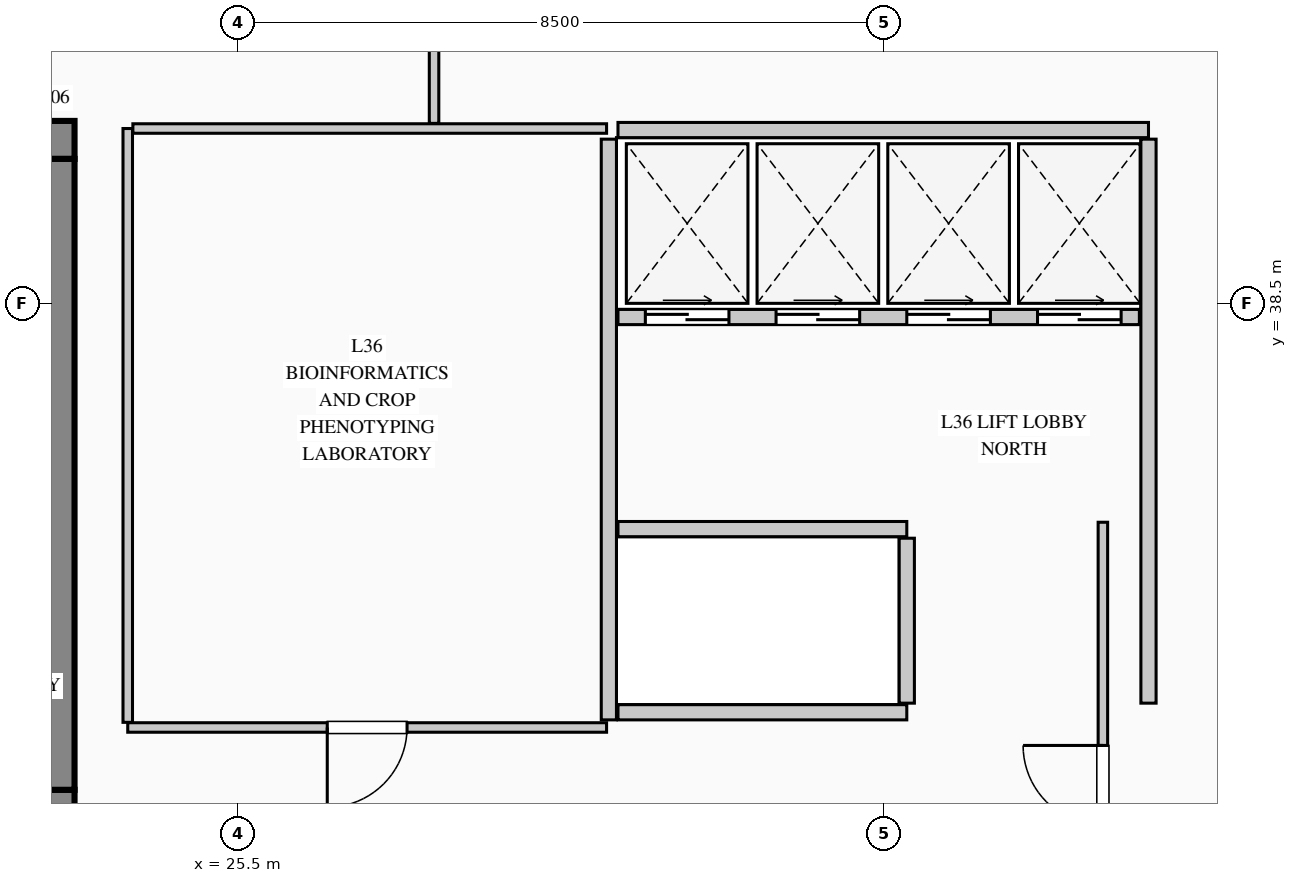
"""IFC4 building model, lengths in metres.
Left out: names, types, materials, properties, quantities, classifications, styles, units other than length and angle.
Written with IfcOpenShell. Run it as: python <this file> out.ifc"""

import sys

from ifc_helpers import new_model, si_unit, direction, frame, frame_2d, origin, place, context, subcontext, project, spatial, rectangle, extrude, element, fill, save


model = new_model("IFC4")
c1 = context("Model", 3, precision=1e-05, world=origin(), true_north=direction((0.0, 1.0)))
c2 = subcontext(c1, "Body", "Model", "MODEL_VIEW")
j1 = project(units=[si_unit("LENGTHUNIT", "METRE"), si_unit("PLANEANGLEUNIT", "RADIAN")], contexts=[c1])
p1 = place(None, origin())
s1 = spatial("IfcSite", under=j1, at=p1, CompositionType="ELEMENT")
p2 = place(p1, origin())
s2 = spatial("IfcBuilding", under=s1, at=p2, CompositionType="ELEMENT")
p3 = place(p2, frame((0.0, 0.0, 154.85)))
s3 = spatial("IfcBuildingStorey", under=s2, at=p3, CompositionType="ELEMENT", Elevation=154.85)
p4 = place(p3, frame((5.5, 40.65, 0.0), z_axis=(0.0, 0.0, 1.0), x_axis=(1.0, 0.0, 0.0)))
e1 = element("IfcWall", 1, at=p4, inside=s3, PredefinedType="SHEAR", context=c2, shape_type="SweptSolid", body=[
    extrude(rectangle(XDim=17.85, YDim=0.5, at=frame_2d((8.925, 0.0))), origin(), (0.0, 0.0, 1.0), 3.95),
])
p5 = place(p4, frame((15.945, 0.0, 0.0)))
e2 = element("IfcOpeningElement", 2, at=p5, cuts=e1, PredefinedType="OPENING", context=c2, shape_type="SweptSolid", body=[
    extrude(rectangle(XDim=1.18, YDim=2.25, at=frame_2d((0.59, 1.125))), frame((0.0, 0.26, 0.0), z_axis=(0.0, -1.0, 0.0), x_axis=(1.0, 0.0, 0.0)), (0.0, 0.0, 1.0), 0.52),
])
p6 = place(p3, frame((5.5, 31.85, 0.0), z_axis=(0.0, 0.0, 1.0), x_axis=(1.0, 0.0, 0.0)))
e3 = element("IfcWall", 3, at=p6, inside=s3, PredefinedType="SHEAR", context=c2, shape_type="SweptSolid", body=[
    extrude(rectangle(XDim=17.85, YDim=0.5, at=frame_2d((8.925, 0.0))), origin(), (0.0, 0.0, 1.0), 3.95),
])
p7 = place(p6, frame((3.15, 0.0, 0.0)))
e4 = element("IfcOpeningElement", 4, at=p7, cuts=e3, PredefinedType="OPENING", context=c2, shape_type="SweptSolid", body=[
    extrude(rectangle(XDim=1.2, YDim=2.2, at=frame_2d((0.6, 1.1))), frame((0.0, 0.26, 0.0), z_axis=(0.0, -1.0, 0.0), x_axis=(1.0, 0.0, 0.0)), (0.0, 0.0, 1.0), 0.52),
])
p8 = place(p6, frame((7.0, 0.0, 0.0)))
e5 = element("IfcOpeningElement", 5, at=p8, cuts=e3, PredefinedType="OPENING", context=c2, shape_type="SweptSolid", body=[
    extrude(rectangle(XDim=1.2, YDim=2.2, at=frame_2d((0.6, 1.1))), frame((0.0, 0.26, 0.0), z_axis=(0.0, -1.0, 0.0), x_axis=(1.0, 0.0, 0.0)), (0.0, 0.0, 1.0), 0.52),
])
p9 = place(p6, frame((8.85, 0.0, 0.0)))
e6 = element("IfcOpeningElement", 6, at=p9, cuts=e3, PredefinedType="OPENING", context=c2, shape_type="SweptSolid", body=[
    extrude(rectangle(XDim=1.15, YDim=2.2, at=frame_2d((0.575, 1.1))), frame((0.0, 0.26, 0.0), z_axis=(0.0, -1.0, 0.0), x_axis=(1.0, 0.0, 0.0)), (0.0, 0.0, 1.0), 0.52),
])
p10 = place(p6, frame((15.95, 0.0, 0.0)))
e7 = element("IfcOpeningElement", 7, at=p10, cuts=e3, PredefinedType="OPENING", context=c2, shape_type="SweptSolid", body=[
    extrude(rectangle(XDim=1.2, YDim=2.2, at=frame_2d((0.6, 1.1))), frame((0.0, 0.26, 0.0), z_axis=(0.0, -1.0, 0.0), x_axis=(1.0, 0.0, 0.0)), (0.0, 0.0, 1.0), 0.52),
])
p11 = place(p3, frame((23.1, 32.1, 0.0), z_axis=(0.0, 0.0, 1.0), x_axis=(0.0, 1.0, 0.0)))
e8 = element("IfcWall", 8, at=p11, inside=s3, PredefinedType="SHEAR", context=c2, shape_type="SweptSolid", body=[
    extrude(rectangle(XDim=8.3, YDim=0.5, at=frame_2d((4.15, 0.0))), origin(), (0.0, 0.0, 1.0), 3.95),
])
p12 = place(p3, frame((30.38, 33.02, 0.0), z_axis=(0.0, 0.0, 1.0), x_axis=(0.0, 1.0, 0.0)))
e9 = element("IfcWall", 9, at=p12, inside=s3, PredefinedType="PARTITIONING", context=c2, shape_type="SweptSolid", body=[
    extrude(rectangle(XDim=7.64, YDim=0.2, at=frame_2d((3.82, 0.0))), origin(), (0.0, 0.0, 1.0), 3.69),
])
p13 = place(p3, frame((30.5, 40.78, 0.0), z_axis=(0.0, 0.0, 1.0), x_axis=(1.0, 0.0, 0.0)))
e10 = element("IfcWall", 10, at=p13, inside=s3, PredefinedType="PARTITIONING", context=c2, shape_type="SweptSolid", body=[
    extrude(rectangle(XDim=6.98, YDim=0.2, at=frame_2d((3.49, 0.0))), origin(), (0.0, 0.0, 1.0), 3.69),
])
p14 = place(p3, frame((37.48, 33.24, 0.0), z_axis=(0.0, 0.0, 1.0), x_axis=(0.0, 1.0, 0.0)))
e11 = element("IfcWall", 11, at=p14, inside=s3, PredefinedType="PARTITIONING", context=c2, shape_type="SweptSolid", body=[
    extrude(rectangle(XDim=7.42, YDim=0.2, at=frame_2d((3.71, 0.0))), origin(), (0.0, 0.0, 1.0), 3.69),
])
p15 = place(p3, frame((30.5, 38.32, 0.0), z_axis=(0.0, 0.0, 1.0), x_axis=(1.0, 0.0, 0.0)))
e12 = element("IfcWall", 12, at=p15, inside=s3, PredefinedType="PARTITIONING", context=c2, shape_type="SweptSolid", body=[
    extrude(rectangle(XDim=6.86, YDim=0.2, at=frame_2d((3.43, 0.0))), origin(), (0.0, 0.0, 1.0), 3.69),
])
p16 = place(p15, frame((0.36, 0.0, 0.0)))
e13 = element("IfcOpeningElement", 13, at=p16, cuts=e12, PredefinedType="OPENING", context=c2, shape_type="SweptSolid", body=[
    extrude(rectangle(XDim=1.1, YDim=2.2, at=frame_2d((0.55, 1.1))), frame((0.0, 0.11, 0.0), z_axis=(0.0, -1.0, 0.0), x_axis=(1.0, 0.0, 0.0)), (0.0, 0.0, 1.0), 0.22),
])
p17 = place(p15, frame((2.08, 0.0, 0.0)))
e14 = element("IfcOpeningElement", 14, at=p17, cuts=e12, PredefinedType="OPENING", context=c2, shape_type="SweptSolid", body=[
    extrude(rectangle(XDim=1.1, YDim=2.2, at=frame_2d((0.55, 1.1))), frame((0.0, 0.11, 0.0), z_axis=(0.0, -1.0, 0.0), x_axis=(1.0, 0.0, 0.0)), (0.0, 0.0, 1.0), 0.22),
])
p18 = place(p15, frame((3.8, 0.0, 0.0)))
e15 = element("IfcOpeningElement", 15, at=p18, cuts=e12, PredefinedType="OPENING", context=c2, shape_type="SweptSolid", body=[
    extrude(rectangle(XDim=1.1, YDim=2.2, at=frame_2d((0.55, 1.1))), frame((0.0, 0.11, 0.0), z_axis=(0.0, -1.0, 0.0), x_axis=(1.0, 0.0, 0.0)), (0.0, 0.0, 1.0), 0.22),
])
p19 = place(p15, frame((5.52, 0.0, 0.0)))
e16 = element("IfcOpeningElement", 16, at=p19, cuts=e12, PredefinedType="OPENING", context=c2, shape_type="SweptSolid", body=[
    extrude(rectangle(XDim=1.1, YDim=2.2, at=frame_2d((0.55, 1.1))), frame((0.0, 0.11, 0.0), z_axis=(0.0, -1.0, 0.0), x_axis=(1.0, 0.0, 0.0)), (0.0, 0.0, 1.0), 0.22),
])
for number, where, z_axis, x_axis in (
    (17, (30.5, 35.53, 0.0), (0.0, 0.0, 1.0), (1.0, 0.0, 0.0)),
    (18, (30.5, 33.12, 0.0), (0.0, 0.0, 1.0), (1.0, 0.0, 0.0)),
):
    element("IfcWall", number, at=place(p3, frame(where, z_axis=z_axis, x_axis=x_axis)), inside=s3, PredefinedType="PARTITIONING", context=c2, shape_type="SweptSolid", body=[
        extrude(rectangle(XDim=3.8, YDim=0.2, at=frame_2d((1.9, 0.0))), origin(), (0.0, 0.0, 1.0), 3.69),
    ])
p20 = place(p3, frame((34.3, 33.24, 0.0), z_axis=(0.0, 0.0, 1.0), x_axis=(0.0, 1.0, 0.0)))
e19 = element("IfcWall", 19, at=p20, inside=s3, PredefinedType="PARTITIONING", context=c2, shape_type="SweptSolid", body=[
    extrude(rectangle(XDim=2.17, YDim=0.2, at=frame_2d((1.085, 0.0))), origin(), (0.0, 0.0, 1.0), 3.69),
])
p21 = place(p3, frame((30.35, 32.92, 0.0), z_axis=(0.0, 0.0, 1.0), x_axis=(-1.0, 0.0, 0.0)))
e20 = element("IfcWall", 20, at=p21, inside=s3, PredefinedType="PARTITIONING", context=c2, shape_type="SweptSolid", body=[
    extrude(rectangle(XDim=6.3, YDim=0.125, at=frame_2d((3.15, 0.0))), origin(), (0.0, 0.0, 1.0), 3.69),
])
p22 = place(p21, frame((2.625, 0.0, 0.0)))
e21 = element("IfcOpeningElement", 21, at=p22, cuts=e20, PredefinedType="OPENING", context=c2, shape_type="SweptSolid", body=[
    extrude(rectangle(XDim=1.05, YDim=2.15, at=frame_2d((0.525, 1.075))), frame((0.0, 0.073, 0.0), z_axis=(0.0, -1.0, 0.0), x_axis=(1.0, 0.0, 0.0)), (0.0, 0.0, 1.0), 0.145),
])
p23 = place(p3, frame((24.05, 32.988, 0.0), z_axis=(0.0, 0.0, 1.0), x_axis=(0.0, 1.0, 0.0)))
e22 = element("IfcWall", 22, at=p23, inside=s3, PredefinedType="PARTITIONING", context=c2, shape_type="SweptSolid", body=[
    extrude(rectangle(XDim=7.812, YDim=0.125, at=frame_2d((3.906, 0.0))), origin(), (0.0, 0.0, 1.0), 3.69),
])
p24 = place(p3, frame((24.117, 40.8, 0.0), z_axis=(0.0, 0.0, 1.0), x_axis=(1.0, 0.0, 0.0)))
e23 = element("IfcWall", 23, at=p24, inside=s3, PredefinedType="PARTITIONING", context=c2, shape_type="SweptSolid", body=[
    extrude(rectangle(XDim=6.233, YDim=0.125, at=frame_2d((3.116, 0.0))), origin(), (0.0, 0.0, 1.0), 3.69),
])
p25 = place(p3, frame((36.88, 28.698, 0.0), z_axis=(0.0, 0.0, 1.0), x_axis=(0.0, 1.0, 0.0)))
e24 = element("IfcWall", 24, at=p25, inside=s3, PredefinedType="PARTITIONING", context=c2, shape_type="SweptSolid", body=[
    extrude(rectangle(XDim=6.923, YDim=0.125, at=frame_2d((3.461, 0.0))), origin(), (0.0, 0.0, 1.0), 3.69),
])
p26 = place(p25, frame((2.936, 0.0, 0.0)))
e25 = element("IfcOpeningElement", 25, at=p26, cuts=e24, PredefinedType="OPENING", context=c2, shape_type="SweptSolid", body=[
    extrude(rectangle(XDim=1.05, YDim=2.15, at=frame_2d((0.525, 1.075))), frame((0.0, 0.073, 0.0), z_axis=(0.0, -1.0, 0.0), x_axis=(1.0, 0.0, 0.0)), (0.0, 0.0, 1.0), 0.145),
])
p27 = place(p3, frame((28.08, 40.867, 0.0), z_axis=(0.0, 0.0, 1.0), x_axis=(0.0, 1.0, 0.0)))
e26 = element("IfcWall", 26, at=p27, inside=s3, PredefinedType="PARTITIONING", context=c2, shape_type="SweptSolid", body=[
    extrude(rectangle(XDim=2.397, YDim=0.125, at=frame_2d((1.199, 0.0))), origin(), (0.0, 0.0, 1.0), 3.69),
])
p28 = place(p16, origin())
e27 = element("IfcDoor", 27, at=p28, inside=s3, OperationType="DOUBLE_DOOR_SLIDING", PredefinedType="DOOR", context=c2, shape_type="SweptSolid", body=[
    extrude(rectangle(XDim=1.1, YDim=2.2, at=frame_2d((0.55, 1.1))), frame((0.0, 0.025, 0.0), z_axis=(0.0, -1.0, 0.0), x_axis=(1.0, 0.0, 0.0)), (0.0, 0.0, 1.0), 0.05),
])
fill(e13, e27)
p29 = place(p17, origin())
e28 = element("IfcDoor", 28, at=p29, inside=s3, OperationType="DOUBLE_DOOR_SLIDING", PredefinedType="DOOR", context=c2, shape_type="SweptSolid", body=[
    extrude(rectangle(XDim=1.1, YDim=2.2, at=frame_2d((0.55, 1.1))), frame((0.0, 0.025, 0.0), z_axis=(0.0, -1.0, 0.0), x_axis=(1.0, 0.0, 0.0)), (0.0, 0.0, 1.0), 0.05),
])
fill(e14, e28)
p30 = place(p18, origin())
e29 = element("IfcDoor", 29, at=p30, inside=s3, OperationType="DOUBLE_DOOR_SLIDING", PredefinedType="DOOR", context=c2, shape_type="SweptSolid", body=[
    extrude(rectangle(XDim=1.1, YDim=2.2, at=frame_2d((0.55, 1.1))), frame((0.0, 0.025, 0.0), z_axis=(0.0, -1.0, 0.0), x_axis=(1.0, 0.0, 0.0)), (0.0, 0.0, 1.0), 0.05),
])
fill(e15, e29)
p31 = place(p19, origin())
e30 = element("IfcDoor", 30, at=p31, inside=s3, OperationType="DOUBLE_DOOR_SLIDING", PredefinedType="DOOR", context=c2, shape_type="SweptSolid", body=[
    extrude(rectangle(XDim=1.1, YDim=2.2, at=frame_2d((0.55, 1.1))), frame((0.0, 0.025, 0.0), z_axis=(0.0, -1.0, 0.0), x_axis=(1.0, 0.0, 0.0)), (0.0, 0.0, 1.0), 0.05),
])
fill(e16, e30)
p32 = place(p22, origin())
e31 = element("IfcDoor", 31, at=p32, inside=s3, OperationType="SINGLE_SWING_RIGHT", PredefinedType="DOOR", context=c2, shape_type="SweptSolid", body=[
    extrude(rectangle(XDim=1.05, YDim=2.15, at=frame_2d((0.525, 1.075))), frame((0.0, 0.025, 0.0), z_axis=(0.0, -1.0, 0.0), x_axis=(1.0, 0.0, 0.0)), (0.0, 0.0, 1.0), 0.05),
])
fill(e21, e31)
p33 = place(p26, origin())
e32 = element("IfcDoor", 32, at=p33, inside=s3, OperationType="SINGLE_SWING_RIGHT", PredefinedType="DOOR", context=c2, shape_type="SweptSolid", body=[
    extrude(rectangle(XDim=1.05, YDim=2.15, at=frame_2d((0.525, 1.075))), frame((0.0, 0.025, 0.0), z_axis=(0.0, -1.0, 0.0), x_axis=(1.0, 0.0, 0.0)), (0.0, 0.0, 1.0), 0.05),
])
fill(e25, e32)
save(model, sys.argv[1])
